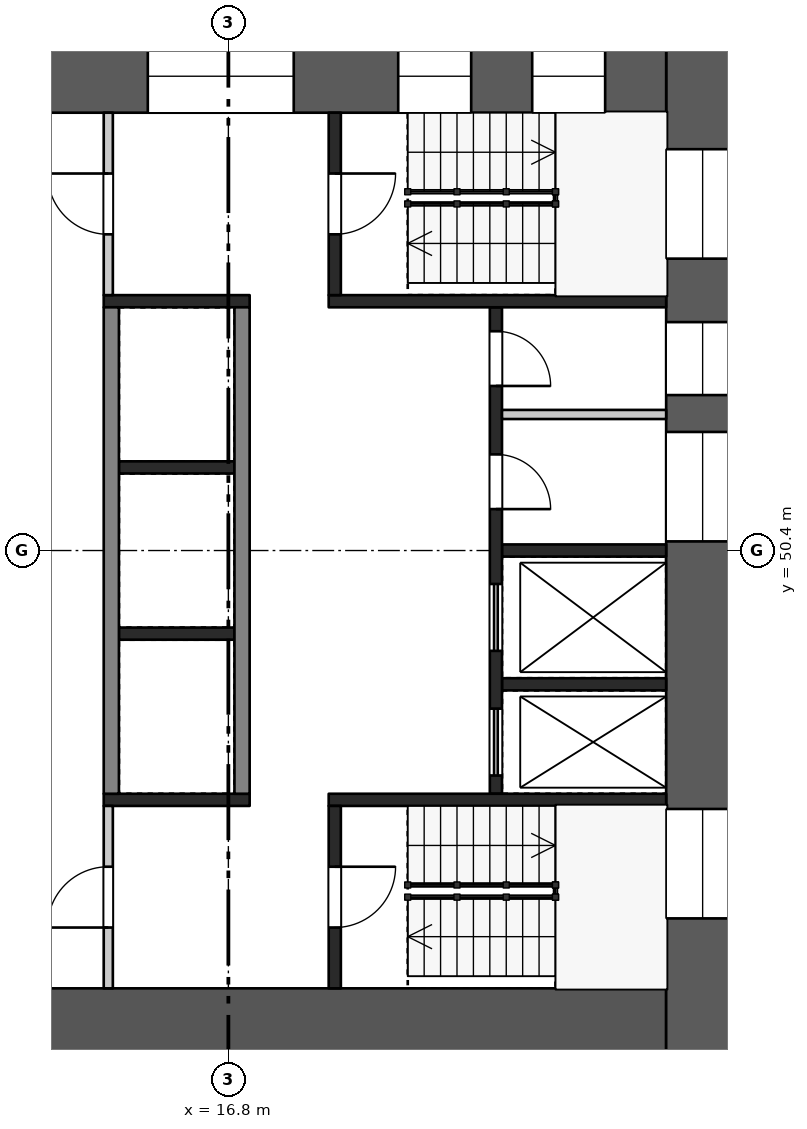
"""IFC4 building model, lengths in metres.
Left out: names, types, materials, properties, quantities, classifications, styles, units other than length and angle.
Written with IfcOpenShell. Run it as: python <this file> out.ifc"""

import sys

from ifc_helpers import new_model, si_unit, direction, frame, frame_2d, origin, place, context, subcontext, project, spatial, rectangle, extrude, element, fill, save


model = new_model("IFC4")
c1 = context("Model", 3, precision=1e-05, world=origin(), true_north=direction((0.0, 1.0)))
c2 = subcontext(c1, "Body", "Model", "MODEL_VIEW")
j1 = project(units=[si_unit("LENGTHUNIT", "METRE"), si_unit("PLANEANGLEUNIT", "RADIAN")], contexts=[c1])
p1 = place(None, origin())
s1 = spatial("IfcSite", under=j1, at=p1, CompositionType="ELEMENT")
p2 = place(p1, origin())
s2 = spatial("IfcBuilding", under=s1, at=p2, CompositionType="ELEMENT")
p3 = place(p2, frame((0.0, 0.0, 35.7)))
s3 = spatial("IfcBuildingStorey", under=s2, at=p3, CompositionType="ELEMENT", Elevation=35.7)
p4 = place(p3, frame((24.6, 58.8, 0.0), z_axis=(0.0, 0.0, 1.0), x_axis=(0.0, -1.0, 0.0)))
e1 = element("IfcWall", 1, at=p4, inside=s3, PredefinedType="SHEAR", context=c2, shape_type="SweptSolid", body=[
    extrude(rectangle(XDim=16.8, YDim=1.2, at=frame_2d((8.4, 0.0))), origin(), (0.0, 0.0, 1.0), 3.22),
])
p5 = place(p4, frame((1.8, 0.0, 0.5)))
e2 = element("IfcOpeningElement", 2, at=p5, cuts=e1, PredefinedType="OPENING", context=c2, shape_type="SweptSolid", body=[
    extrude(rectangle(XDim=1.8, YDim=2.4, at=frame_2d((0.9, 1.2))), frame((0.0, 0.61, 0.0), z_axis=(0.0, -1.0, 0.0), x_axis=(1.0, 0.0, 0.0)), (0.0, 0.0, 1.0), 1.22),
])
p6 = place(p4, frame((4.644, 0.0, 1.6)))
e3 = element("IfcOpeningElement", 3, at=p6, cuts=e1, PredefinedType="OPENING", context=c2, shape_type="SweptSolid", body=[
    extrude(rectangle(XDim=1.2, YDim=1.2, at=frame_2d((0.6, 0.6))), frame((0.0, 0.61, 0.0), z_axis=(0.0, -1.0, 0.0), x_axis=(1.0, 0.0, 0.0)), (0.0, 0.0, 1.0), 1.22),
])
p7 = place(p4, frame((6.45, 0.0, 1.6)))
e4 = element("IfcOpeningElement", 4, at=p7, cuts=e1, PredefinedType="OPENING", context=c2, shape_type="SweptSolid", body=[
    extrude(rectangle(XDim=1.8, YDim=1.2, at=frame_2d((0.9, 0.6))), frame((0.0, 0.61, 0.0), z_axis=(0.0, -1.0, 0.0), x_axis=(1.0, 0.0, 0.0)), (0.0, 0.0, 1.0), 1.22),
])
p8 = place(p4, frame((12.65, 0.0, 0.5)))
e5 = element("IfcOpeningElement", 5, at=p8, cuts=e1, PredefinedType="OPENING", context=c2, shape_type="SweptSolid", body=[
    extrude(rectangle(XDim=1.8, YDim=2.4, at=frame_2d((0.9, 1.2))), frame((0.0, 0.61, 0.0), z_axis=(0.0, -1.0, 0.0), x_axis=(1.0, 0.0, 0.0)), (0.0, 0.0, 1.0), 1.22),
])
p9 = place(p3, frame((9.6, 58.2, 0.0), z_axis=(0.0, 0.0, 1.0), x_axis=(1.0, 0.0, 0.0)))
e6 = element("IfcWall", 6, at=p9, inside=s3, PredefinedType="SHEAR", context=c2, shape_type="SweptSolid", body=[
    extrude(rectangle(XDim=14.4, YDim=1.2, at=frame_2d((7.2, 0.0))), origin(), (0.0, 0.0, 1.0), 3.22),
])
p10 = place(p9, frame((1.105, 0.0, 0.6)))
e7 = element("IfcOpeningElement", 7, at=p10, cuts=e6, PredefinedType="OPENING", context=c2, shape_type="SweptSolid", body=[
    extrude(rectangle(XDim=3.0, YDim=2.1, at=frame_2d((1.5, 1.05))), frame((0.0, 0.61, 0.0), z_axis=(0.0, -1.0, 0.0), x_axis=(1.0, 0.0, 0.0)), (0.0, 0.0, 1.0), 1.22),
])
p11 = place(p9, frame((5.875, 0.0, 0.6)))
e8 = element("IfcOpeningElement", 8, at=p11, cuts=e6, PredefinedType="OPENING", context=c2, shape_type="SweptSolid", body=[
    extrude(rectangle(XDim=2.4, YDim=2.1, at=frame_2d((1.2, 1.05))), frame((0.0, 0.61, 0.0), z_axis=(0.0, -1.0, 0.0), x_axis=(1.0, 0.0, 0.0)), (0.0, 0.0, 1.0), 1.22),
])
p12 = place(p9, frame((9.993, 0.0, 0.5)))
e9 = element("IfcOpeningElement", 9, at=p12, cuts=e6, PredefinedType="OPENING", context=c2, shape_type="SweptSolid", body=[
    extrude(rectangle(XDim=1.2, YDim=2.4, at=frame_2d((0.6, 1.2))), frame((0.0, 0.61, 0.0), z_axis=(0.0, -1.0, 0.0), x_axis=(1.0, 0.0, 0.0)), (0.0, 0.0, 1.0), 1.22),
])
p13 = place(p9, frame((12.197, 0.0, 0.5)))
e10 = element("IfcOpeningElement", 10, at=p13, cuts=e6, PredefinedType="OPENING", context=c2, shape_type="SweptSolid", body=[
    extrude(rectangle(XDim=1.2, YDim=2.4, at=frame_2d((0.6, 1.2))), frame((0.0, 0.61, 0.0), z_axis=(0.0, -1.0, 0.0), x_axis=(1.0, 0.0, 0.0)), (0.0, 0.0, 1.0), 1.22),
])
p14 = place(p3, frame((9.6, 42.6, 0.0), z_axis=(0.0, 0.0, 1.0), x_axis=(1.0, 0.0, 0.0)))
e11 = element("IfcWall", 11, at=p14, inside=s3, PredefinedType="SHEAR", context=c2, shape_type="SweptSolid", body=[
    extrude(rectangle(XDim=14.4, YDim=1.2, at=frame_2d((7.2, 0.0))), origin(), (0.0, 0.0, 1.0), 3.22),
])
p15 = place(p14, frame((2.1, 0.0, 0.0)))
e12 = element("IfcOpeningElement", 12, at=p15, cuts=e11, PredefinedType="OPENING", context=c2, shape_type="SweptSolid", body=[
    extrude(rectangle(XDim=1.8, YDim=2.1, at=frame_2d((0.9, 1.05))), frame((0.0, 0.61, 0.0), z_axis=(0.0, -1.0, 0.0), x_axis=(1.0, 0.0, 0.0)), (0.0, 0.0, 1.0), 1.22),
])
for number, where, z_axis, x_axis in (
    (13, (15.0, 51.767, 0.0), (0.0, 0.0, 1.0), (1.0, 0.0, 0.0)),
    (14, (15.0, 49.033, 0.0), (0.0, 0.0, 1.0), (1.0, 0.0, 0.0)),
):
    element("IfcWall", number, at=place(p3, frame(where, z_axis=z_axis, x_axis=x_axis)), inside=s3, PredefinedType="SHEAR", context=c2, shape_type="SweptSolid", body=[
        extrude(rectangle(XDim=1.9, YDim=0.2, at=frame_2d((0.95, 0.0))), origin(), (0.0, 0.0, 1.0), 3.22),
    ])
for number, where, z_axis, x_axis in (
    (15, (14.875, 54.4, 0.0), (0.0, 0.0, 1.0), (0.0, -1.0, 0.0)),
    (16, (17.025, 54.4, 0.0), (0.0, 0.0, 1.0), (0.0, -1.0, 0.0)),
):
    element("IfcWall", number, at=place(p3, frame(where, z_axis=z_axis, x_axis=x_axis)), inside=s3, PredefinedType="SHEAR", context=c2, shape_type="SweptSolid", body=[
        extrude(rectangle(XDim=8.0, YDim=0.25, at=frame_2d((4.0, 0.0))), origin(), (0.0, 0.0, 1.0), 3.22),
    ])
for number, where, z_axis, x_axis in (
    (17, (21.3, 50.4, 0.0), (0.0, 0.0, 1.0), (1.0, 0.0, 0.0)),
    (18, (21.3, 48.2, 0.0), (0.0, 0.0, 1.0), (1.0, 0.0, 0.0)),
):
    element("IfcWall", number, at=place(p3, frame(where, z_axis=z_axis, x_axis=x_axis)), inside=s3, PredefinedType="SHEAR", context=c2, shape_type="SweptSolid", body=[
        extrude(rectangle(XDim=2.7, YDim=0.2, at=frame_2d((1.35, 0.0))), origin(), (0.0, 0.0, 1.0), 3.22),
    ])
p16 = place(p3, frame((21.3, 52.637, 0.0), z_axis=(0.0, 0.0, 1.0), x_axis=(1.0, 0.0, 0.0)))
e19 = element("IfcWall", 19, at=p16, inside=s3, PredefinedType="PARTITIONING", context=c2, shape_type="SweptSolid", body=[
    extrude(rectangle(XDim=2.7, YDim=0.15, at=frame_2d((1.35, 0.0))), origin(), (0.0, 0.0, 1.0), 3.22),
])
p17 = place(p3, frame((21.2, 54.4, 0.0), z_axis=(0.0, 0.0, 1.0), x_axis=(0.0, -1.0, 0.0)))
e20 = element("IfcWall", 20, at=p17, inside=s3, PredefinedType="SHEAR", context=c2, shape_type="SweptSolid", body=[
    extrude(rectangle(XDim=8.0, YDim=0.2, at=frame_2d((4.0, 0.0))), origin(), (0.0, 0.0, 1.0), 3.22),
])
p18 = place(p17, frame((0.394, 0.0, 0.0)))
e21 = element("IfcOpeningElement", 21, at=p18, cuts=e20, PredefinedType="OPENING", context=c2, shape_type="SweptSolid", body=[
    extrude(rectangle(XDim=0.9, YDim=2.1, at=frame_2d((0.45, 1.05))), frame((0.0, 0.11, 0.0), z_axis=(0.0, -1.0, 0.0), x_axis=(1.0, 0.0, 0.0)), (0.0, 0.0, 1.0), 0.22),
])
p19 = place(p17, frame((2.419, 0.0, 0.0)))
e22 = element("IfcOpeningElement", 22, at=p19, cuts=e20, PredefinedType="OPENING", context=c2, shape_type="SweptSolid", body=[
    extrude(rectangle(XDim=0.9, YDim=2.1, at=frame_2d((0.45, 1.05))), frame((0.0, 0.11, 0.0), z_axis=(0.0, -1.0, 0.0), x_axis=(1.0, 0.0, 0.0)), (0.0, 0.0, 1.0), 0.22),
])
p20 = place(p17, frame((4.55, 0.0, 0.0)))
e23 = element("IfcOpeningElement", 23, at=p20, cuts=e20, PredefinedType="OPENING", context=c2, shape_type="SweptSolid", body=[
    extrude(rectangle(XDim=1.1, YDim=2.1, at=frame_2d((0.55, 1.05))), frame((0.0, 0.11, 0.0), z_axis=(0.0, -1.0, 0.0), x_axis=(1.0, 0.0, 0.0)), (0.0, 0.0, 1.0), 0.22),
])
p21 = place(p17, frame((6.6, 0.0, 0.0)))
e24 = element("IfcOpeningElement", 24, at=p21, cuts=e20, PredefinedType="OPENING", context=c2, shape_type="SweptSolid", body=[
    extrude(rectangle(XDim=1.1, YDim=2.1, at=frame_2d((0.55, 1.05))), frame((0.0, 0.11, 0.0), z_axis=(0.0, -1.0, 0.0), x_axis=(1.0, 0.0, 0.0)), (0.0, 0.0, 1.0), 0.22),
])
p22 = place(p3, frame((14.75, 54.5, 0.0), z_axis=(0.0, 0.0, 1.0), x_axis=(1.0, 0.0, 0.0)))
e25 = element("IfcWall", 25, at=p22, inside=s3, PredefinedType="SHEAR", context=c2, shape_type="SweptSolid", body=[
    extrude(rectangle(XDim=2.4, YDim=0.2, at=frame_2d((1.2, 0.0))), origin(), (0.0, 0.0, 1.0), 3.22),
])
p23 = place(p3, frame((18.45, 54.5, 0.0), z_axis=(0.0, 0.0, 1.0), x_axis=(1.0, 0.0, 0.0)))
e26 = element("IfcWall", 26, at=p23, inside=s3, PredefinedType="SHEAR", context=c2, shape_type="SweptSolid", body=[
    extrude(rectangle(XDim=5.55, YDim=0.2, at=frame_2d((2.775, 0.0))), origin(), (0.0, 0.0, 1.0), 3.22),
])
p24 = place(p3, frame((14.825, 57.6, 0.0), z_axis=(0.0, 0.0, 1.0), x_axis=(0.0, -1.0, 0.0)))
e27 = element("IfcWall", 27, at=p24, inside=s3, PredefinedType="PARTITIONING", context=c2, shape_type="SweptSolid", body=[
    extrude(rectangle(XDim=3.0, YDim=0.15, at=frame_2d((1.5, 0.0))), origin(), (0.0, 0.0, 1.0), 3.22),
])
p25 = place(p24, frame((1.0, 0.0, 0.0)))
e28 = element("IfcOpeningElement", 28, at=p25, cuts=e27, PredefinedType="OPENING", context=c2, shape_type="SweptSolid", body=[
    extrude(rectangle(XDim=1.0, YDim=2.1, at=frame_2d((0.5, 1.05))), frame((0.0, 0.085, 0.0), z_axis=(0.0, -1.0, 0.0), x_axis=(1.0, 0.0, 0.0)), (0.0, 0.0, 1.0), 0.17),
])
p26 = place(p3, frame((18.55, 57.6, 0.0), z_axis=(0.0, 0.0, 1.0), x_axis=(0.0, -1.0, 0.0)))
e29 = element("IfcWall", 29, at=p26, inside=s3, PredefinedType="SHEAR", context=c2, shape_type="SweptSolid", body=[
    extrude(rectangle(XDim=3.0, YDim=0.2, at=frame_2d((1.5, 0.0))), origin(), (0.0, 0.0, 1.0), 3.22),
])
p27 = place(p26, frame((1.0, 0.0, 0.0)))
e30 = element("IfcOpeningElement", 30, at=p27, cuts=e29, PredefinedType="OPENING", context=c2, shape_type="SweptSolid", body=[
    extrude(rectangle(XDim=1.0, YDim=2.1, at=frame_2d((0.5, 1.05))), frame((0.0, 0.11, 0.0), z_axis=(0.0, -1.0, 0.0), x_axis=(1.0, 0.0, 0.0)), (0.0, 0.0, 1.0), 0.22),
])
p28 = place(p3, frame((14.75, 46.3, 0.0), z_axis=(0.0, 0.0, 1.0), x_axis=(1.0, 0.0, 0.0)))
e31 = element("IfcWall", 31, at=p28, inside=s3, PredefinedType="SHEAR", context=c2, shape_type="SweptSolid", body=[
    extrude(rectangle(XDim=2.4, YDim=0.2, at=frame_2d((1.2, 0.0))), origin(), (0.0, 0.0, 1.0), 3.22),
])
p29 = place(p3, frame((18.45, 46.3, 0.0), z_axis=(0.0, 0.0, 1.0), x_axis=(1.0, 0.0, 0.0)))
e32 = element("IfcWall", 32, at=p29, inside=s3, PredefinedType="SHEAR", context=c2, shape_type="SweptSolid", body=[
    extrude(rectangle(XDim=5.55, YDim=0.2, at=frame_2d((2.775, 0.0))), origin(), (0.0, 0.0, 1.0), 3.22),
])
p30 = place(p3, frame((14.825, 46.2, 0.0), z_axis=(0.0, 0.0, 1.0), x_axis=(0.0, -1.0, 0.0)))
e33 = element("IfcWall", 33, at=p30, inside=s3, PredefinedType="PARTITIONING", context=c2, shape_type="SweptSolid", body=[
    extrude(rectangle(XDim=3.0, YDim=0.15, at=frame_2d((1.5, 0.0))), origin(), (0.0, 0.0, 1.0), 3.22),
])
p31 = place(p30, frame((1.0, 0.0, 0.0)))
e34 = element("IfcOpeningElement", 34, at=p31, cuts=e33, PredefinedType="OPENING", context=c2, shape_type="SweptSolid", body=[
    extrude(rectangle(XDim=1.0, YDim=2.1, at=frame_2d((0.5, 1.05))), frame((0.0, 0.085, 0.0), z_axis=(0.0, -1.0, 0.0), x_axis=(1.0, 0.0, 0.0)), (0.0, 0.0, 1.0), 0.17),
])
p32 = place(p3, frame((18.55, 46.2, 0.0), z_axis=(0.0, 0.0, 1.0), x_axis=(0.0, -1.0, 0.0)))
e35 = element("IfcWall", 35, at=p32, inside=s3, PredefinedType="SHEAR", context=c2, shape_type="SweptSolid", body=[
    extrude(rectangle(XDim=3.0, YDim=0.2, at=frame_2d((1.5, 0.0))), origin(), (0.0, 0.0, 1.0), 3.22),
])
p33 = place(p32, frame((1.0, 0.0, 0.0)))
e36 = element("IfcOpeningElement", 36, at=p33, cuts=e35, PredefinedType="OPENING", context=c2, shape_type="SweptSolid", body=[
    extrude(rectangle(XDim=1.0, YDim=2.1, at=frame_2d((0.5, 1.05))), frame((0.0, 0.11, 0.0), z_axis=(0.0, -1.0, 0.0), x_axis=(1.0, 0.0, 0.0)), (0.0, 0.0, 1.0), 0.22),
])
p34 = place(p18, origin())
e37 = element("IfcDoor", 37, at=p34, inside=s3, OperationType="SINGLE_SWING_RIGHT", PredefinedType="DOOR", context=c2, shape_type="SweptSolid", body=[
    extrude(rectangle(XDim=0.9, YDim=2.1, at=frame_2d((0.45, 1.05))), frame((0.0, 0.025, 0.0), z_axis=(0.0, -1.0, 0.0), x_axis=(1.0, 0.0, 0.0)), (0.0, 0.0, 1.0), 0.05),
])
fill(e21, e37)
p35 = place(p19, origin())
e38 = element("IfcDoor", 38, at=p35, inside=s3, OperationType="SINGLE_SWING_RIGHT", PredefinedType="DOOR", context=c2, shape_type="SweptSolid", body=[
    extrude(rectangle(XDim=0.9, YDim=2.1, at=frame_2d((0.45, 1.05))), frame((0.0, 0.025, 0.0), z_axis=(0.0, -1.0, 0.0), x_axis=(1.0, 0.0, 0.0)), (0.0, 0.0, 1.0), 0.05),
])
fill(e22, e38)
p36 = place(p20, origin())
e39 = element("IfcDoor", 39, at=p36, inside=s3, OperationType="DOUBLE_DOOR_SLIDING", PredefinedType="DOOR", context=c2, shape_type="SweptSolid", body=[
    extrude(rectangle(XDim=1.1, YDim=2.1, at=frame_2d((0.55, 1.05))), frame((0.0, 0.025, 0.0), z_axis=(0.0, -1.0, 0.0), x_axis=(1.0, 0.0, 0.0)), (0.0, 0.0, 1.0), 0.05),
])
fill(e23, e39)
p37 = place(p21, origin())
e40 = element("IfcDoor", 40, at=p37, inside=s3, OperationType="DOUBLE_DOOR_SLIDING", PredefinedType="DOOR", context=c2, shape_type="SweptSolid", body=[
    extrude(rectangle(XDim=1.1, YDim=2.1, at=frame_2d((0.55, 1.05))), frame((0.0, 0.025, 0.0), z_axis=(0.0, -1.0, 0.0), x_axis=(1.0, 0.0, 0.0)), (0.0, 0.0, 1.0), 0.05),
])
fill(e24, e40)
p38 = place(p25, frame((1.0, 0.0, 0.0), z_axis=(0.0, 0.0, 1.0), x_axis=(-1.0, 0.0, 0.0)))
e41 = element("IfcDoor", 41, at=p38, inside=s3, OperationType="SINGLE_SWING_RIGHT", PredefinedType="DOOR", context=c2, shape_type="SweptSolid", body=[
    extrude(rectangle(XDim=1.0, YDim=2.1, at=frame_2d((0.5, 1.05))), frame((0.0, 0.025, 0.0), z_axis=(0.0, -1.0, 0.0), x_axis=(1.0, 0.0, 0.0)), (0.0, 0.0, 1.0), 0.05),
])
fill(e28, e41)
p39 = place(p27, origin())
e42 = element("IfcDoor", 42, at=p39, inside=s3, OperationType="SINGLE_SWING_LEFT", PredefinedType="DOOR", context=c2, shape_type="SweptSolid", body=[
    extrude(rectangle(XDim=1.0, YDim=2.1, at=frame_2d((0.5, 1.05))), frame((0.0, 0.025, 0.0), z_axis=(0.0, -1.0, 0.0), x_axis=(1.0, 0.0, 0.0)), (0.0, 0.0, 1.0), 0.05),
])
fill(e30, e42)
p40 = place(p31, frame((1.0, 0.0, 0.0), z_axis=(0.0, 0.0, 1.0), x_axis=(-1.0, 0.0, 0.0)))
e43 = element("IfcDoor", 43, at=p40, inside=s3, OperationType="SINGLE_SWING_LEFT", PredefinedType="DOOR", context=c2, shape_type="SweptSolid", body=[
    extrude(rectangle(XDim=1.0, YDim=2.1, at=frame_2d((0.5, 1.05))), frame((0.0, 0.025, 0.0), z_axis=(0.0, -1.0, 0.0), x_axis=(1.0, 0.0, 0.0)), (0.0, 0.0, 1.0), 0.05),
])
fill(e34, e43)
p41 = place(p33, origin())
e44 = element("IfcDoor", 44, at=p41, inside=s3, OperationType="SINGLE_SWING_LEFT", PredefinedType="DOOR", context=c2, shape_type="SweptSolid", body=[
    extrude(rectangle(XDim=1.0, YDim=2.1, at=frame_2d((0.5, 1.05))), frame((0.0, 0.025, 0.0), z_axis=(0.0, -1.0, 0.0), x_axis=(1.0, 0.0, 0.0)), (0.0, 0.0, 1.0), 0.05),
])
fill(e36, e44)
p42 = place(p5, origin())
e45 = element("IfcWindow", 45, at=p42, inside=s3, PartitioningType="SINGLE_PANEL", PredefinedType="WINDOW", context=c2, shape_type="SweptSolid", body=[
    extrude(rectangle(XDim=1.8, YDim=2.4, at=frame_2d((0.9, 1.2))), frame((0.0, 0.03, 0.0), z_axis=(0.0, -1.0, 0.0), x_axis=(1.0, 0.0, 0.0)), (0.0, 0.0, 1.0), 0.06),
])
fill(e2, e45)
p43 = place(p6, origin())
e46 = element("IfcWindow", 46, at=p43, inside=s3, PartitioningType="SINGLE_PANEL", PredefinedType="WINDOW", context=c2, shape_type="SweptSolid", body=[
    extrude(rectangle(XDim=1.2, YDim=1.2, at=frame_2d((0.6, 0.6))), frame((0.0, 0.03, 0.0), z_axis=(0.0, -1.0, 0.0), x_axis=(1.0, 0.0, 0.0)), (0.0, 0.0, 1.0), 0.06),
])
fill(e3, e46)
p44 = place(p7, origin())
e47 = element("IfcWindow", 47, at=p44, inside=s3, PartitioningType="SINGLE_PANEL", PredefinedType="WINDOW", context=c2, shape_type="SweptSolid", body=[
    extrude(rectangle(XDim=1.8, YDim=1.2, at=frame_2d((0.9, 0.6))), frame((0.0, 0.03, 0.0), z_axis=(0.0, -1.0, 0.0), x_axis=(1.0, 0.0, 0.0)), (0.0, 0.0, 1.0), 0.06),
])
fill(e4, e47)
p45 = place(p8, origin())
e48 = element("IfcWindow", 48, at=p45, inside=s3, PartitioningType="SINGLE_PANEL", PredefinedType="WINDOW", context=c2, shape_type="SweptSolid", body=[
    extrude(rectangle(XDim=1.8, YDim=2.4, at=frame_2d((0.9, 1.2))), frame((0.0, 0.03, 0.0), z_axis=(0.0, -1.0, 0.0), x_axis=(1.0, 0.0, 0.0)), (0.0, 0.0, 1.0), 0.06),
])
fill(e5, e48)
p46 = place(p11, origin())
e49 = element("IfcWindow", 49, at=p46, inside=s3, PartitioningType="SINGLE_PANEL", PredefinedType="WINDOW", context=c2, shape_type="SweptSolid", body=[
    extrude(rectangle(XDim=2.4, YDim=2.1, at=frame_2d((1.2, 1.05))), frame((0.0, 0.03, 0.0), z_axis=(0.0, -1.0, 0.0), x_axis=(1.0, 0.0, 0.0)), (0.0, 0.0, 1.0), 0.06),
])
fill(e8, e49)
p47 = place(p12, origin())
e50 = element("IfcWindow", 50, at=p47, inside=s3, PartitioningType="SINGLE_PANEL", PredefinedType="WINDOW", context=c2, shape_type="SweptSolid", body=[
    extrude(rectangle(XDim=1.2, YDim=2.4, at=frame_2d((0.6, 1.2))), frame((0.0, 0.03, 0.0), z_axis=(0.0, -1.0, 0.0), x_axis=(1.0, 0.0, 0.0)), (0.0, 0.0, 1.0), 0.06),
])
fill(e9, e50)
p48 = place(p13, origin())
e51 = element("IfcWindow", 51, at=p48, inside=s3, PartitioningType="SINGLE_PANEL", PredefinedType="WINDOW", context=c2, shape_type="SweptSolid", body=[
    extrude(rectangle(XDim=1.2, YDim=2.4, at=frame_2d((0.6, 1.2))), frame((0.0, 0.03, 0.0), z_axis=(0.0, -1.0, 0.0), x_axis=(1.0, 0.0, 0.0)), (0.0, 0.0, 1.0), 0.06),
])
fill(e10, e51)
save(model, sys.argv[1])
